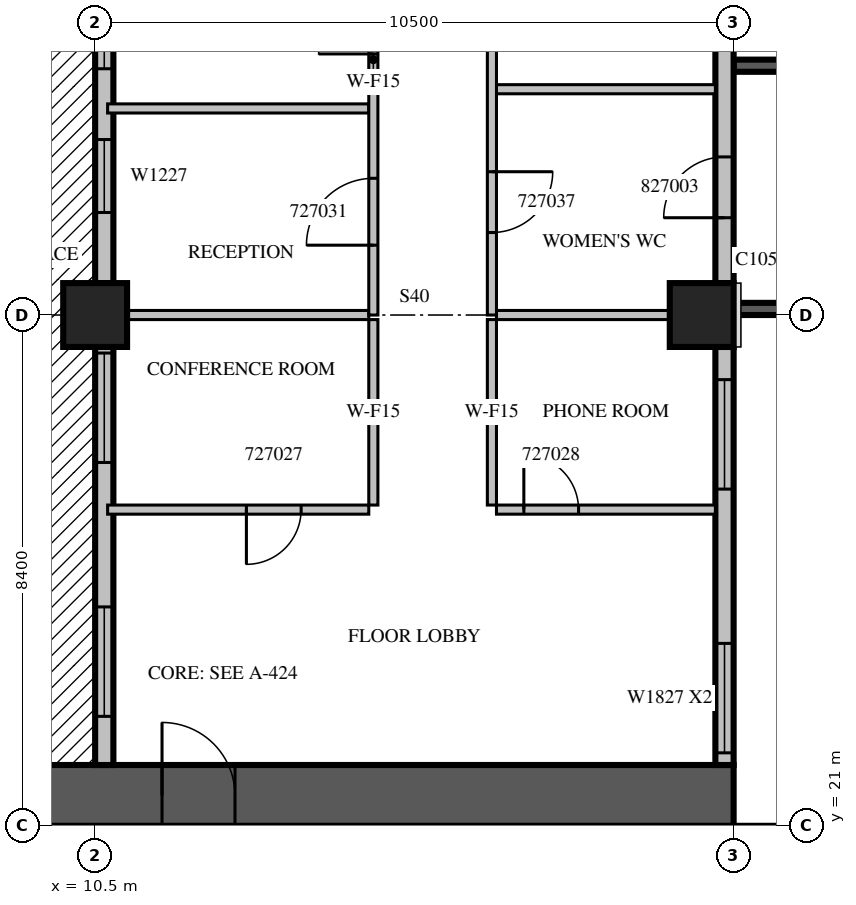
"""IFC4 building model, lengths in metres.
Left out: names, types, materials, properties, quantities, classifications, styles, units other than length and angle.
Written with IfcOpenShell. Run it as: python <this file> out.ifc"""

import sys

from ifc_helpers import new_model, si_unit, direction, frame, frame_2d, origin, origin_2d, place, context, subcontext, project, spatial, rectangle, extrude, source, transform, mapped, element, fill, save


model = new_model("IFC4")
c1 = context("Model", 3, precision=1e-05, world=origin(), true_north=direction((0.0, 1.0)))
c2 = subcontext(c1, "Body", "Model", "MODEL_VIEW")
j1 = project(units=[si_unit("LENGTHUNIT", "METRE"), si_unit("PLANEANGLEUNIT", "RADIAN")], contexts=[c1])
p1 = place(None, origin())
s1 = spatial("IfcSite", under=j1, at=p1, CompositionType="ELEMENT")
p2 = place(p1, origin())
s2 = spatial("IfcBuilding", under=s1, at=p2, CompositionType="ELEMENT")
p3 = place(p2, frame((0.0, 0.0, 124.5)))
s3 = spatial("IfcBuildingStorey", under=s2, at=p3, CompositionType="ELEMENT", Elevation=124.5)
m1 = source(origin(), c2, "Body", "SweptSolid", [
    extrude(rectangle(XDim=1.05, YDim=1.05, at=origin_2d()), origin(), (0.0, 0.0, 1.0), 4.2),
])
for number, where, z_axis, x_axis in (
    (1, (10.5, 29.4, 0.0), (0.0, 0.0, 1.0), (1.0, 0.0, 0.0)),
    (2, (20.475, 29.4, 0.0), (0.0, 0.0, 1.0), (1.0, 0.0, 0.0)),
):
    element("IfcColumn", number, at=place(p3, frame(where, z_axis=z_axis, x_axis=x_axis)), inside=s3, PredefinedType="COLUMN", context=c2, shape_type="MappedRepresentation", body=[
        mapped(m1, transform((0.0, 0.0, 0.0), scale=1.0)),
    ])
m2 = source(origin(), c2, "Body", "SweptSolid", [
    extrude(rectangle(XDim=16.8, YDim=1.0, at=frame_2d((8.4, 0.0))), origin(), (0.0, 0.0, 1.0), 4.2),
])
p4 = place(p3, frame((4.2, 21.5, 0.0), z_axis=(0.0, 0.0, 1.0), x_axis=(1.0, 0.0, 0.0)))
e3 = element("IfcWall", 3, at=p4, inside=s3, PredefinedType="SHEAR", context=c2, shape_type="MappedRepresentation", body=[
    mapped(m2, transform((0.0, 0.0, 0.0), scale=1.0)),
])
m3 = source(origin(), c2, "Body", "SweptSolid", [
    extrude(rectangle(XDim=1.2, YDim=2.1, at=frame_2d((0.6, 1.05))), frame((0.0, 0.51, 0.0), z_axis=(0.0, -1.0, 0.0), x_axis=(1.0, 0.0, 0.0)), (0.0, 0.0, 1.0), 1.02),
])
p5 = place(p4, frame((7.4, 0.0, 0.0)))
e4 = element("IfcOpeningElement", 4, at=p5, cuts=e3, PredefinedType="OPENING", context=c2, shape_type="MappedRepresentation", body=[
    mapped(m3, transform((0.0, 0.0, 0.0), scale=1.0)),
])
m4 = source(origin(), c2, "Body", "SweptSolid", [
    extrude(rectangle(XDim=3.9, YDim=0.2, at=frame_2d((1.95, 0.0))), origin(), (0.0, 0.0, 1.0), 3.8),
])
p6 = place(p3, frame((21.0, 29.5, 0.0), z_axis=(0.0, 0.0, 1.0), x_axis=(1.0, 0.0, 0.0)))
e5 = element("IfcWall", 5, at=p6, inside=s3, PredefinedType="SOLIDWALL", context=c2, shape_type="MappedRepresentation", body=[
    mapped(m4, transform((0.0, 0.0, 0.0), scale=1.0)),
])
m5 = source(origin(), c2, "Body", "SweptSolid", [
    extrude(rectangle(XDim=2.4, YDim=2.7, at=frame_2d((1.2, 1.35))), frame((0.0, 0.11, 0.0), z_axis=(0.0, -1.0, 0.0), x_axis=(1.0, 0.0, 0.0)), (0.0, 0.0, 1.0), 0.22),
])
p7 = place(p6, frame((0.75, 0.0, 0.6)))
e6 = element("IfcOpeningElement", 6, at=p7, cuts=e5, PredefinedType="OPENING", context=c2, shape_type="MappedRepresentation", body=[
    mapped(m5, transform((0.0, 0.0, 0.0), scale=1.0)),
])
p8 = place(p3, frame((21.0, 33.5, 0.0), z_axis=(0.0, 0.0, 1.0), x_axis=(1.0, 0.0, 0.0)))
e7 = element("IfcWall", 7, at=p8, inside=s3, PredefinedType="SOLIDWALL", context=c2, shape_type="MappedRepresentation", body=[
    mapped(m4, transform((0.0, 0.0, 0.0), scale=1.0)),
])
p9 = place(p8, frame((0.75, 0.0, 0.6)))
e8 = element("IfcOpeningElement", 8, at=p9, cuts=e7, PredefinedType="OPENING", context=c2, shape_type="MappedRepresentation", body=[
    mapped(m5, transform((0.0, 0.0, 0.0), scale=1.0)),
])
m6 = source(origin(), c2, "Body", "SweptSolid", [
    extrude(rectangle(XDim=6.875, YDim=0.3, at=frame_2d((3.438, 0.0))), origin(), (0.0, 0.0, 1.0), 3.8),
])
p10 = place(p3, frame((20.85, 22.0, 0.0), z_axis=(0.0, 0.0, 1.0), x_axis=(0.0, 1.0, 0.0)))
e9 = element("IfcWall", 9, at=p10, inside=s3, PredefinedType="STANDARD", context=c2, shape_type="MappedRepresentation", body=[
    mapped(m6, transform((0.0, 0.0, 0.0), scale=1.0)),
])
m7 = source(origin(), c2, "Body", "SweptSolid", [
    extrude(rectangle(XDim=1.8, YDim=2.7, at=frame_2d((0.9, 1.35))), frame((0.0, 0.16, 0.0), z_axis=(0.0, -1.0, 0.0), x_axis=(1.0, 0.0, 0.0)), (0.0, 0.0, 1.0), 0.32),
])
p11 = place(p10, frame((0.2, 0.0, 0.6)))
e10 = element("IfcOpeningElement", 10, at=p11, cuts=e9, PredefinedType="OPENING", context=c2, shape_type="MappedRepresentation", body=[
    mapped(m7, transform((0.0, 0.0, 0.0), scale=1.0)),
])
p12 = place(p10, frame((4.537, 0.0, 0.6)))
e11 = element("IfcOpeningElement", 11, at=p12, cuts=e9, PredefinedType="OPENING", context=c2, shape_type="MappedRepresentation", body=[
    mapped(m7, transform((0.0, 0.0, 0.0), scale=1.0)),
])
m8 = source(origin(), c2, "Body", "SweptSolid", [
    extrude(rectangle(XDim=7.35, YDim=0.3, at=frame_2d((3.675, 0.0))), origin(), (0.0, 0.0, 1.0), 3.8),
])
p13 = place(p3, frame((20.85, 29.925, 0.0), z_axis=(0.0, 0.0, 1.0), x_axis=(0.0, 1.0, 0.0)))
e12 = element("IfcWall", 12, at=p13, inside=s3, PredefinedType="STANDARD", context=c2, shape_type="MappedRepresentation", body=[
    mapped(m8, transform((0.0, 0.0, 0.0), scale=1.0)),
])
m9 = source(origin(), c2, "Body", "SweptSolid", [
    extrude(rectangle(XDim=1.0, YDim=2.1, at=frame_2d((0.5, 1.05))), frame((0.0, 0.16, 0.0), z_axis=(0.0, -1.0, 0.0), x_axis=(1.0, 0.0, 0.0)), (0.0, 0.0, 1.0), 0.32),
])
p14 = place(p13, frame((1.075, 0.0, 0.0)))
e13 = element("IfcOpeningElement", 13, at=p14, cuts=e12, PredefinedType="OPENING", context=c2, shape_type="MappedRepresentation", body=[
    mapped(m9, transform((0.0, 0.0, 0.0), scale=1.0)),
])
p15 = place(p3, frame((10.65, 37.275, 0.0), z_axis=(0.0, 0.0, 1.0), x_axis=(0.0, -1.0, 0.0)))
e14 = element("IfcWall", 14, at=p15, inside=s3, PredefinedType="STANDARD", context=c2, shape_type="MappedRepresentation", body=[
    mapped(m8, transform((0.0, 0.0, 0.0), scale=1.0)),
])
m10 = source(origin(), c2, "Body", "SweptSolid", [
    extrude(rectangle(XDim=1.8, YDim=2.4, at=frame_2d((0.9, 1.2))), frame((0.0, 0.16, 0.0), z_axis=(0.0, -1.0, 0.0), x_axis=(1.0, 0.0, 0.0)), (0.0, 0.0, 1.0), 0.32),
])
p16 = place(p15, frame((2.025, 0.0, 0.0)))
e15 = element("IfcOpeningElement", 15, at=p16, cuts=e14, PredefinedType="OPENING", context=c2, shape_type="MappedRepresentation", body=[
    mapped(m10, transform((0.0, 0.0, 0.0), scale=1.0)),
])
m11 = source(origin(), c2, "Body", "SweptSolid", [
    extrude(rectangle(XDim=1.2, YDim=2.7, at=frame_2d((0.6, 1.35))), frame((0.0, 0.16, 0.0), z_axis=(0.0, -1.0, 0.0), x_axis=(1.0, 0.0, 0.0)), (0.0, 0.0, 1.0), 0.32),
])
p17 = place(p15, frame((4.989, 0.0, 0.6)))
e16 = element("IfcOpeningElement", 16, at=p17, cuts=e14, PredefinedType="OPENING", context=c2, shape_type="MappedRepresentation", body=[
    mapped(m11, transform((0.0, 0.0, 0.0), scale=1.0)),
])
p18 = place(p3, frame((10.65, 28.875, 0.0), z_axis=(0.0, 0.0, 1.0), x_axis=(0.0, -1.0, 0.0)))
e17 = element("IfcWall", 17, at=p18, inside=s3, PredefinedType="STANDARD", context=c2, shape_type="MappedRepresentation", body=[
    mapped(m6, transform((0.0, 0.0, 0.0), scale=1.0)),
])
p19 = place(p18, frame((0.1, 0.0, 0.0)))
e18 = element("IfcOpeningElement", 18, at=p19, cuts=e17, PredefinedType="OPENING", context=c2, shape_type="MappedRepresentation", body=[
    mapped(m10, transform((0.0, 0.0, 0.0), scale=1.0)),
])
p20 = place(p18, frame((4.275, 0.0, 0.0)))
e19 = element("IfcOpeningElement", 19, at=p20, cuts=e17, PredefinedType="OPENING", context=c2, shape_type="MappedRepresentation", body=[
    mapped(m10, transform((0.0, 0.0, 0.0), scale=1.0)),
])
m12 = source(origin(), c2, "Body", "SweptSolid", [
    extrude(rectangle(XDim=4.295, YDim=0.15, at=frame_2d((2.147, 0.0))), origin(), (0.0, 0.0, 1.0), 3.8),
])
p21 = place(p3, frame((10.705, 26.2, 0.0), z_axis=(0.0, 0.0, 1.0), x_axis=(1.0, 0.0, 0.0)))
e20 = element("IfcWall", 20, at=p21, inside=s3, PredefinedType="PARTITIONING", context=c2, shape_type="MappedRepresentation", body=[
    mapped(m12, transform((0.0, 0.0, 0.0), scale=1.0)),
])
m13 = source(origin(), c2, "Body", "SweptSolid", [
    extrude(rectangle(XDim=0.9, YDim=2.1, at=frame_2d((0.45, 1.05))), frame((0.0, 0.085, 0.0), z_axis=(0.0, -1.0, 0.0), x_axis=(1.0, 0.0, 0.0)), (0.0, 0.0, 1.0), 0.17),
])
p22 = place(p21, frame((2.283, 0.0, 0.0)))
e21 = element("IfcOpeningElement", 21, at=p22, cuts=e20, PredefinedType="OPENING", context=c2, shape_type="MappedRepresentation", body=[
    mapped(m13, transform((0.0, 0.0, 0.0), scale=1.0)),
])
m14 = source(origin(), c2, "Body", "SweptSolid", [
    extrude(rectangle(XDim=3.6, YDim=0.15, at=frame_2d((1.8, 0.0))), origin(), (0.0, 0.0, 1.0), 3.8),
])
p23 = place(p3, frame((17.1, 26.2, 0.0), z_axis=(0.0, 0.0, 1.0), x_axis=(1.0, 0.0, 0.0)))
e22 = element("IfcWall", 22, at=p23, inside=s3, PredefinedType="PARTITIONING", context=c2, shape_type="MappedRepresentation", body=[
    mapped(m14, transform((0.0, 0.0, 0.0), scale=1.0)),
])
p24 = place(p23, frame((0.45, 0.0, 0.0)))
e23 = element("IfcOpeningElement", 23, at=p24, cuts=e22, PredefinedType="OPENING", context=c2, shape_type="MappedRepresentation", body=[
    mapped(m13, transform((0.0, 0.0, 0.0), scale=1.0)),
])
m15 = source(origin(), c2, "Body", "SweptSolid", [
    extrude(rectangle(XDim=3.05, YDim=0.15, at=frame_2d((1.525, 0.0))), origin(), (0.0, 0.0, 1.0), 3.8),
])
for number, where, z_axis, x_axis in (
    (24, (15.075, 26.275, 0.0), (0.0, 0.0, 1.0), (0.0, 1.0, 0.0)),
    (25, (17.025, 29.325, 0.0), (0.0, 0.0, 1.0), (0.0, -1.0, 0.0)),
):
    element("IfcWall", number, at=place(p3, frame(where, z_axis=z_axis, x_axis=x_axis)), inside=s3, PredefinedType="PARTITIONING", context=c2, shape_type="MappedRepresentation", body=[
        mapped(m15, transform((0.0, 0.0, 0.0), scale=1.0)),
    ])
m16 = source(origin(), c2, "Body", "SweptSolid", [
    extrude(rectangle(XDim=3.976, YDim=0.15, at=frame_2d((1.988, 0.0))), origin(), (0.0, 0.0, 1.0), 3.8),
])
p25 = place(p3, frame((15.0, 29.4, 0.0), z_axis=(0.0, 0.0, 1.0), x_axis=(-1.0, 0.0, 0.0)))
e26 = element("IfcWall", 26, at=p25, inside=s3, PredefinedType="PARTITIONING", context=c2, shape_type="MappedRepresentation", body=[
    mapped(m16, transform((0.0, 0.0, 0.0), scale=1.0)),
])
m17 = source(origin(), c2, "Body", "SweptSolid", [
    extrude(rectangle(XDim=2.851, YDim=0.15, at=frame_2d((1.425, 0.0))), origin(), (0.0, 0.0, 1.0), 3.8),
])
p26 = place(p3, frame((19.951, 29.4, 0.0), z_axis=(0.0, 0.0, 1.0), x_axis=(-1.0, 0.0, 0.0)))
e27 = element("IfcWall", 27, at=p26, inside=s3, PredefinedType="PARTITIONING", context=c2, shape_type="MappedRepresentation", body=[
    mapped(m17, transform((0.0, 0.0, 0.0), scale=1.0)),
])
p27 = place(p3, frame((15.0, 32.797, 0.0), z_axis=(0.0, 0.0, 1.0), x_axis=(-1.0, 0.0, 0.0)))
e28 = element("IfcWall", 28, at=p27, inside=s3, PredefinedType="PARTITIONING", context=c2, shape_type="MappedRepresentation", body=[
    mapped(m12, transform((0.0, 0.0, 0.0), scale=1.0)),
])
p28 = place(p3, frame((17.1, 33.113, 0.0), z_axis=(0.0, 0.0, 1.0), x_axis=(1.0, 0.0, 0.0)))
e29 = element("IfcWall", 29, at=p28, inside=s3, PredefinedType="PARTITIONING", context=c2, shape_type="MappedRepresentation", body=[
    mapped(m14, transform((0.0, 0.0, 0.0), scale=1.0)),
])
m18 = source(origin(), c2, "Body", "SweptSolid", [
    extrude(rectangle(XDim=8.4, YDim=0.15, at=frame_2d((4.2, 0.0))), origin(), (0.0, 0.0, 1.0), 3.8),
])
p29 = place(p3, frame((15.075, 29.4, 0.0), z_axis=(0.0, 0.0, 1.0), x_axis=(0.0, 1.0, 0.0)))
e30 = element("IfcWall", 30, at=p29, inside=s3, PredefinedType="PARTITIONING", context=c2, shape_type="MappedRepresentation", body=[
    mapped(m18, transform((0.0, 0.0, 0.0), scale=1.0)),
])
m19 = source(origin(), c2, "Body", "SweptSolid", [
    extrude(rectangle(XDim=1.1, YDim=2.1, at=frame_2d((0.55, 1.05))), frame((0.0, 0.085, 0.0), z_axis=(0.0, -1.0, 0.0), x_axis=(1.0, 0.0, 0.0)), (0.0, 0.0, 1.0), 0.17),
])
p30 = place(p29, frame((1.149, 0.0, 0.0)))
e31 = element("IfcOpeningElement", 31, at=p30, cuts=e30, PredefinedType="OPENING", context=c2, shape_type="MappedRepresentation", body=[
    mapped(m19, transform((0.0, 0.0, 0.0), scale=1.0)),
])
p31 = place(p29, frame((4.293, 0.0, 0.0)))
e32 = element("IfcOpeningElement", 32, at=p31, cuts=e30, PredefinedType="OPENING", context=c2, shape_type="MappedRepresentation", body=[
    mapped(m13, transform((0.0, 0.0, 0.0), scale=1.0)),
])
p32 = place(p29, frame((6.795, 0.0, 0.0)))
e33 = element("IfcOpeningElement", 33, at=p32, cuts=e30, PredefinedType="OPENING", context=c2, shape_type="MappedRepresentation", body=[
    mapped(m13, transform((0.0, 0.0, 0.0), scale=1.0)),
])
m20 = source(origin(), c2, "Body", "SweptSolid", [
    extrude(rectangle(XDim=19.86, YDim=0.15, at=frame_2d((9.93, 0.0))), origin(), (0.0, 0.0, 1.0), 3.8),
])
p33 = place(p3, frame((17.025, 49.26, 0.0), z_axis=(0.0, 0.0, 1.0), x_axis=(0.0, -1.0, 0.0)))
e34 = element("IfcWall", 34, at=p33, inside=s3, PredefinedType="PARTITIONING", context=c2, shape_type="MappedRepresentation", body=[
    mapped(m20, transform((0.0, 0.0, 0.0), scale=1.0)),
])
m21 = source(origin(), c2, "Body", "SweptSolid", [
    extrude(rectangle(XDim=1.0, YDim=2.1, at=frame_2d((0.5, 1.05))), frame((0.0, 0.085, 0.0), z_axis=(0.0, -1.0, 0.0), x_axis=(1.0, 0.0, 0.0)), (0.0, 0.0, 1.0), 0.17),
])
p34 = place(p33, frame((17.503, 0.0, 0.0)))
e35 = element("IfcOpeningElement", 35, at=p34, cuts=e34, PredefinedType="OPENING", context=c2, shape_type="MappedRepresentation", body=[
    mapped(m21, transform((0.0, 0.0, 0.0), scale=1.0)),
])
p35 = place(p33, frame((14.191, 0.0, 0.0)))
e36 = element("IfcOpeningElement", 36, at=p35, cuts=e34, PredefinedType="OPENING", context=c2, shape_type="MappedRepresentation", body=[
    mapped(m21, transform((0.0, 0.0, 0.0), scale=1.0)),
])
p36 = place(p33, frame((11.848, 0.0, 0.0)))
e37 = element("IfcOpeningElement", 37, at=p36, cuts=e34, PredefinedType="OPENING", context=c2, shape_type="MappedRepresentation", body=[
    mapped(m21, transform((0.0, 0.0, 0.0), scale=1.0)),
])
m22 = source(origin(), c2, "Body", "SweptSolid", [
    extrude(rectangle(XDim=1.2, YDim=2.1, at=frame_2d((0.6, 1.05))), frame((0.0, 0.085, 0.0), z_axis=(0.0, -1.0, 0.0), x_axis=(1.0, 0.0, 0.0)), (0.0, 0.0, 1.0), 0.17),
])
p37 = place(p33, frame((7.976, 0.0, 0.0)))
e38 = element("IfcOpeningElement", 38, at=p37, cuts=e34, PredefinedType="OPENING", context=c2, shape_type="MappedRepresentation", body=[
    mapped(m22, transform((0.0, 0.0, 0.0), scale=1.0)),
])
p38 = place(p33, frame((2.209, 0.0, 0.0)))
e39 = element("IfcOpeningElement", 39, at=p38, cuts=e34, PredefinedType="OPENING", context=c2, shape_type="MappedRepresentation", body=[
    mapped(m22, transform((0.0, 0.0, 0.0), scale=1.0)),
])
m23 = source(origin(), c2, "Body", "SweptSolid", [
    extrude(rectangle(XDim=1.8, YDim=2.7, at=frame_2d((0.9, 1.35))), frame((0.0, 0.03, 0.0), z_axis=(0.0, -1.0, 0.0), x_axis=(1.0, 0.0, 0.0)), (0.0, 0.0, 1.0), 0.06),
])
p39 = place(p11, origin())
e40 = element("IfcWindow", 40, at=p39, inside=s3, PartitioningType="SINGLE_PANEL", PredefinedType="WINDOW", context=c2, shape_type="MappedRepresentation", body=[
    mapped(m23, transform((0.0, 0.0, 0.0), scale=1.0)),
])
fill(e10, e40)
p40 = place(p12, origin())
e41 = element("IfcWindow", 41, at=p40, inside=s3, PartitioningType="SINGLE_PANEL", PredefinedType="WINDOW", context=c2, shape_type="MappedRepresentation", body=[
    mapped(m23, transform((0.0, 0.0, 0.0), scale=1.0)),
])
fill(e11, e41)
m24 = source(origin(), c2, "Body", "SweptSolid", [
    extrude(rectangle(XDim=1.8, YDim=2.4, at=frame_2d((0.9, 1.2))), frame((0.0, 0.025, 0.0), z_axis=(0.0, -1.0, 0.0), x_axis=(1.0, 0.0, 0.0)), (0.0, 0.0, 1.0), 0.05),
])
p41 = place(p16, origin())
e42 = element("IfcDoor", 42, at=p41, inside=s3, OperationType="SLIDING_TO_LEFT", PredefinedType="DOOR", context=c2, shape_type="MappedRepresentation", body=[
    mapped(m24, transform((0.0, 0.0, 0.0), scale=1.0)),
])
fill(e15, e42)
m25 = source(origin(), c2, "Body", "SweptSolid", [
    extrude(rectangle(XDim=1.2, YDim=2.7, at=frame_2d((0.6, 1.35))), frame((0.0, 0.03, 0.0), z_axis=(0.0, -1.0, 0.0), x_axis=(1.0, 0.0, 0.0)), (0.0, 0.0, 1.0), 0.06),
])
p42 = place(p17, origin())
e43 = element("IfcWindow", 43, at=p42, inside=s3, PartitioningType="SINGLE_PANEL", PredefinedType="WINDOW", context=c2, shape_type="MappedRepresentation", body=[
    mapped(m25, transform((0.0, 0.0, 0.0), scale=1.0)),
])
fill(e16, e43)
p43 = place(p19, origin())
e44 = element("IfcDoor", 44, at=p43, inside=s3, OperationType="SLIDING_TO_LEFT", PredefinedType="DOOR", context=c2, shape_type="MappedRepresentation", body=[
    mapped(m24, transform((0.0, 0.0, 0.0), scale=1.0)),
])
fill(e18, e44)
p44 = place(p20, origin())
e45 = element("IfcDoor", 45, at=p44, inside=s3, OperationType="SLIDING_TO_LEFT", PredefinedType="DOOR", context=c2, shape_type="MappedRepresentation", body=[
    mapped(m24, transform((0.0, 0.0, 0.0), scale=1.0)),
])
fill(e19, e45)
m26 = source(origin(), c2, "Body", "SweptSolid", [
    extrude(rectangle(XDim=1.2, YDim=2.1, at=frame_2d((0.6, 1.05))), frame((0.0, 0.025, 0.0), z_axis=(0.0, -1.0, 0.0), x_axis=(1.0, 0.0, 0.0)), (0.0, 0.0, 1.0), 0.05),
])
p45 = place(p5, origin())
e46 = element("IfcDoor", 46, at=p45, inside=s3, OperationType="SINGLE_SWING_LEFT", PredefinedType="DOOR", context=c2, shape_type="MappedRepresentation", body=[
    mapped(m26, transform((0.0, 0.0, 0.0), scale=1.0)),
])
fill(e4, e46)
m27 = source(origin(), c2, "Body", "SweptSolid", [
    extrude(rectangle(XDim=0.9, YDim=2.1, at=frame_2d((0.45, 1.05))), frame((0.0, 0.025, 0.0), z_axis=(0.0, -1.0, 0.0), x_axis=(1.0, 0.0, 0.0)), (0.0, 0.0, 1.0), 0.05),
])
p46 = place(p22, origin())
e47 = element("IfcDoor", 47, at=p46, inside=s3, OperationType="SINGLE_SWING_RIGHT", PredefinedType="DOOR", context=c2, shape_type="MappedRepresentation", body=[
    mapped(m27, transform((0.0, 0.0, 0.0), scale=1.0)),
])
fill(e21, e47)
p47 = place(p24, origin())
e48 = element("IfcDoor", 48, at=p47, inside=s3, OperationType="SINGLE_SWING_LEFT", PredefinedType="DOOR", context=c2, shape_type="MappedRepresentation", body=[
    mapped(m27, transform((0.0, 0.0, 0.0), scale=1.0)),
])
fill(e23, e48)
m28 = source(origin(), c2, "Body", "SweptSolid", [
    extrude(rectangle(XDim=1.1, YDim=2.1, at=frame_2d((0.55, 1.05))), frame((0.0, 0.025, 0.0), z_axis=(0.0, -1.0, 0.0), x_axis=(1.0, 0.0, 0.0)), (0.0, 0.0, 1.0), 0.05),
])
p48 = place(p30, origin())
e49 = element("IfcDoor", 49, at=p48, inside=s3, OperationType="SINGLE_SWING_LEFT", PredefinedType="DOOR", context=c2, shape_type="MappedRepresentation", body=[
    mapped(m28, transform((0.0, 0.0, 0.0), scale=1.0)),
])
fill(e31, e49)
p49 = place(p31, origin())
e50 = element("IfcDoor", 50, at=p49, inside=s3, OperationType="SINGLE_SWING_LEFT", PredefinedType="DOOR", context=c2, shape_type="MappedRepresentation", body=[
    mapped(m27, transform((0.0, 0.0, 0.0), scale=1.0)),
])
fill(e32, e50)
m29 = source(origin(), c2, "Body", "SweptSolid", [
    extrude(rectangle(XDim=1.0, YDim=2.1, at=frame_2d((0.5, 1.05))), frame((0.0, 0.025, 0.0), z_axis=(0.0, -1.0, 0.0), x_axis=(1.0, 0.0, 0.0)), (0.0, 0.0, 1.0), 0.05),
])
p50 = place(p34, origin())
e51 = element("IfcDoor", 51, at=p50, inside=s3, OperationType="SINGLE_SWING_LEFT", PredefinedType="DOOR", context=c2, shape_type="MappedRepresentation", body=[
    mapped(m29, transform((0.0, 0.0, 0.0), scale=1.0)),
])
fill(e35, e51)
p51 = place(p14, origin())
e52 = element("IfcDoor", 52, at=p51, inside=s3, OperationType="SINGLE_SWING_LEFT", PredefinedType="DOOR", context=c2, shape_type="MappedRepresentation", body=[
    mapped(m29, transform((0.0, 0.0, 0.0), scale=1.0)),
])
fill(e13, e52)
save(model, sys.argv[1])
